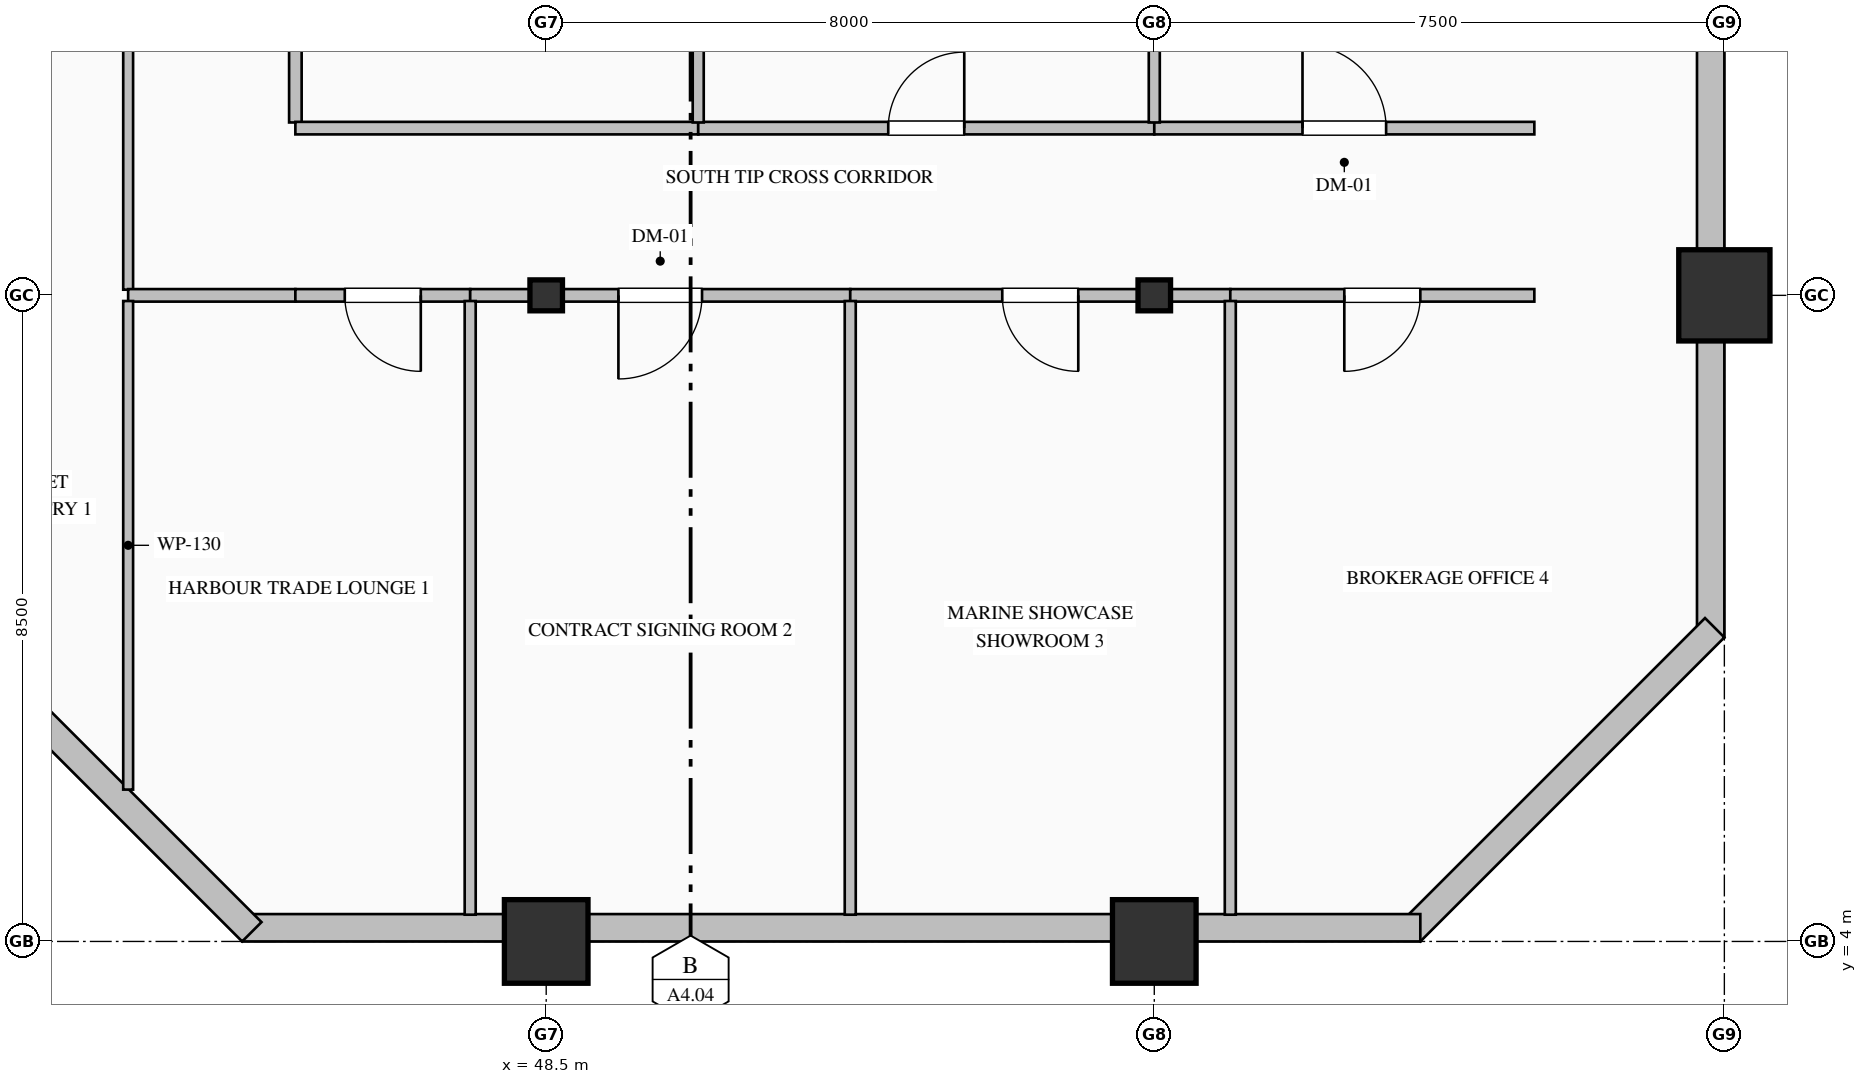
"""IFC4 building model, lengths in metres.
Left out: names, types, materials, properties, quantities, classifications, styles, units other than length and angle.
Written with IfcOpenShell. Run it as: python <this file> out.ifc"""

import sys

from ifc_helpers import new_model, si_unit, direction, frame, frame_2d, origin, origin_2d, place, context, subcontext, project, spatial, rectangle, hollow_rectangle, hollow_circle, i_section, extrude, element, fill, save


model = new_model("IFC4")
c1 = context("Model", 3, precision=1e-05, world=origin(), true_north=direction((0.0, 1.0)))
c2 = subcontext(c1, "Body", "Model", "MODEL_VIEW")
j1 = project(units=[si_unit("LENGTHUNIT", "METRE"), si_unit("PLANEANGLEUNIT", "RADIAN")], contexts=[c1])
p1 = place(None, origin())
s1 = spatial("IfcSite", under=j1, at=p1, CompositionType="ELEMENT")
p2 = place(p1, origin())
s2 = spatial("IfcBuilding", under=s1, at=p2, CompositionType="ELEMENT")
p3 = place(p2, frame((0.0, 0.0, 92.2)))
s3 = spatial("IfcBuildingStorey", under=s2, at=p3, CompositionType="ELEMENT", Elevation=92.2)
p4 = place(p3, frame((48.5, 4.0, 0.0), z_axis=(0.0, 0.0, 1.0), x_axis=(1.0, 0.0, 0.0)))
e1 = element("IfcColumn", 1, at=p4, inside=s3, PredefinedType="COLUMN", context=c2, shape_type="SweptSolid", body=[
    extrude(hollow_rectangle(XDim=1.1, YDim=1.1, WallThickness=0.04, at=origin_2d()), origin(), (0.0, 0.0, 1.0), 4.0),
])
p5 = place(p3, frame((48.5, 12.5, 0.0), z_axis=(0.0, 0.0, 1.0), x_axis=(1.0, 0.0, 0.0)))
e2 = element("IfcColumn", 2, at=p5, inside=s3, PredefinedType="COLUMN", context=c2, shape_type="SweptSolid", body=[
    extrude(i_section(OverallWidth=0.407, OverallDepth=0.428, WebThickness=0.02, FlangeThickness=0.035, FilletRadius=0.022, at=origin_2d()), origin(), (0.0, 0.0, 1.0), 4.0),
])
p6 = place(p3, frame((56.5, 4.0, 0.0), z_axis=(0.0, 0.0, 1.0), x_axis=(1.0, 0.0, 0.0)))
e3 = element("IfcColumn", 3, at=p6, inside=s3, PredefinedType="COLUMN", context=c2, shape_type="SweptSolid", body=[
    extrude(hollow_rectangle(XDim=1.1, YDim=1.1, WallThickness=0.04, at=origin_2d()), origin(), (0.0, 0.0, 1.0), 4.0),
])
p7 = place(p3, frame((56.5, 12.5, 0.0), z_axis=(0.0, 0.0, 1.0), x_axis=(1.0, 0.0, 0.0)))
e4 = element("IfcColumn", 4, at=p7, inside=s3, PredefinedType="COLUMN", context=c2, shape_type="SweptSolid", body=[
    extrude(i_section(OverallWidth=0.407, OverallDepth=0.428, WebThickness=0.02, FlangeThickness=0.035, FilletRadius=0.022, at=origin_2d()), origin(), (0.0, 0.0, 1.0), 4.0),
])
p8 = place(p3, frame((64.0, 12.5, 0.0), z_axis=(0.0, 0.0, 1.0), x_axis=(1.0, 0.0, 0.0)))
e5 = element("IfcColumn", 5, at=p8, inside=s3, PredefinedType="COLUMN", context=c2, shape_type="SweptSolid", body=[
    extrude(hollow_circle(Radius=0.6, WallThickness=0.04, at=origin_2d()), origin(), (0.0, 0.0, 1.0), 4.0),
])
p9 = place(p3, frame((63.82, 36.05, 0.0), z_axis=(0.0, 0.0, 1.0), x_axis=(0.0, -1.0, 0.0)))
e6 = element("IfcWall", 6, at=p9, inside=s3, PredefinedType="SOLIDWALL", context=c2, shape_type="SweptSolid", body=[
    extrude(rectangle(XDim=28.05, YDim=0.36, at=frame_2d((14.025, 0.0))), origin(), (0.0, 0.0, 1.0), 3.25),
])
p10 = place(p9, frame((2.55, 0.0, 0.85)))
e7 = element("IfcOpeningElement", 7, at=p10, cuts=e6, PredefinedType="OPENING", context=c2, shape_type="SweptSolid", body=[
    extrude(rectangle(XDim=2.1, YDim=2.05, at=frame_2d((1.05, 1.025))), frame((0.0, 0.19, 0.0), z_axis=(0.0, -1.0, 0.0), x_axis=(1.0, 0.0, 0.0)), (0.0, 0.0, 1.0), 0.38),
])
p11 = place(p9, frame((13.35, 0.0, 0.85)))
e8 = element("IfcOpeningElement", 8, at=p11, cuts=e6, PredefinedType="OPENING", context=c2, shape_type="SweptSolid", body=[
    extrude(rectangle(XDim=2.1, YDim=2.05, at=frame_2d((1.05, 1.025))), frame((0.0, 0.19, 0.0), z_axis=(0.0, -1.0, 0.0), x_axis=(1.0, 0.0, 0.0)), (0.0, 0.0, 1.0), 0.38),
])
p12 = place(p3, frame((63.873, 8.127, 0.0), z_axis=(0.0, 0.0, 1.0), x_axis=(-0.707106781187, -0.707106781187, 0.0)))
e9 = element("IfcWall", 9, at=p12, inside=s3, PredefinedType="SOLIDWALL", context=c2, shape_type="SweptSolid", body=[
    extrude(rectangle(XDim=5.657, YDim=0.36, at=frame_2d((2.828, 0.0))), origin(), (0.0, 0.0, 1.0), 3.75),
])
p13 = place(p3, frame((60.0, 4.18, 0.0), z_axis=(0.0, 0.0, 1.0), x_axis=(-1.0, 0.0, 0.0)))
e10 = element("IfcWall", 10, at=p13, inside=s3, PredefinedType="SOLIDWALL", context=c2, shape_type="SweptSolid", body=[
    extrude(rectangle(XDim=15.5, YDim=0.36, at=frame_2d((7.75, 0.0))), origin(), (0.0, 0.0, 1.0), 3.25),
])
p14 = place(p3, frame((44.627, 4.127, 0.0), z_axis=(0.0, 0.0, 1.0), x_axis=(-0.707106781187, 0.707106781187, 0.0)))
e11 = element("IfcWall", 11, at=p14, inside=s3, PredefinedType="SOLIDWALL", context=c2, shape_type="SweptSolid", body=[
    extrude(rectangle(XDim=5.657, YDim=0.36, at=frame_2d((2.828, 0.0))), origin(), (0.0, 0.0, 1.0), 3.75),
])
p15 = place(p3, frame((45.2, 24.226, 0.0), z_axis=(0.0, 0.0, 1.0), x_axis=(0.0, -1.0, 0.0)))
e12 = element("IfcWall", 12, at=p15, inside=s3, PredefinedType="PARTITIONING", context=c2, shape_type="SweptSolid", body=[
    extrude(rectangle(XDim=9.451, YDim=0.165, at=frame_2d((4.726, 0.0))), origin(), (0.0, 0.0, 1.0), 3.75),
])
p16 = place(p15, frame((4.226, 0.0, 0.0)))
e13 = element("IfcOpeningElement", 13, at=p16, cuts=e12, PredefinedType="OPENING", context=c2, shape_type="SweptSolid", body=[
    extrude(rectangle(XDim=1.0, YDim=2.15, at=frame_2d((0.5, 1.075))), frame((0.0, 0.093, 0.0), z_axis=(0.0, -1.0, 0.0), x_axis=(1.0, 0.0, 0.0)), (0.0, 0.0, 1.0), 0.185),
])
p17 = place(p3, frame((43.0, 12.574, 0.0), z_axis=(0.0, 0.0, 1.0), x_axis=(0.0, 1.0, 0.0)))
e14 = element("IfcWall", 14, at=p17, inside=s3, PredefinedType="PARTITIONING", context=c2, shape_type="SweptSolid", body=[
    extrude(rectangle(XDim=7.369, YDim=0.13, at=frame_2d((3.684, 0.0))), origin(), (0.0, 0.0, 1.0), 3.75),
])
p18 = place(p17, frame((3.184, 0.0, 0.0)))
e15 = element("IfcOpeningElement", 15, at=p18, cuts=e14, PredefinedType="OPENING", context=c2, shape_type="SweptSolid", body=[
    extrude(rectangle(XDim=1.0, YDim=2.15, at=frame_2d((0.5, 1.075))), frame((0.0, 0.075, 0.0), z_axis=(0.0, -1.0, 0.0), x_axis=(1.0, 0.0, 0.0)), (0.0, 0.0, 1.0), 0.15),
])
p19 = place(p3, frame((45.2, 12.5, 0.0), z_axis=(0.0, 0.0, 1.0), x_axis=(-1.0, 0.0, 0.0)))
e16 = element("IfcWall", 16, at=p19, inside=s3, PredefinedType="PARTITIONING", context=c2, shape_type="SweptSolid", body=[
    extrude(rectangle(XDim=2.2, YDim=0.165, at=frame_2d((1.1, 0.0))), origin(), (0.0, 0.0, 1.0), 3.042),
])
p20 = place(p3, frame((45.2, 14.7, 0.0), z_axis=(0.0, 0.0, 1.0), x_axis=(1.0, 0.0, 0.0)))
e17 = element("IfcWall", 17, at=p20, inside=s3, PredefinedType="PARTITIONING", context=c2, shape_type="SweptSolid", body=[
    extrude(rectangle(XDim=5.3, YDim=0.165, at=frame_2d((2.65, 0.0))), origin(), (0.0, 0.0, 1.0), 3.75),
])
p21 = place(p3, frame((50.5, 14.7, 0.0), z_axis=(0.0, 0.0, 1.0), x_axis=(1.0, 0.0, 0.0)))
e18 = element("IfcWall", 18, at=p21, inside=s3, PredefinedType="PARTITIONING", context=c2, shape_type="SweptSolid", body=[
    extrude(rectangle(XDim=6.0, YDim=0.165, at=frame_2d((3.0, 0.0))), origin(), (0.0, 0.0, 1.0), 3.75),
])
p22 = place(p21, frame((2.5, 0.0, 0.0)))
e19 = element("IfcOpeningElement", 19, at=p22, cuts=e18, PredefinedType="OPENING", context=c2, shape_type="SweptSolid", body=[
    extrude(rectangle(XDim=1.0, YDim=2.15, at=frame_2d((0.5, 1.075))), frame((0.0, 0.093, 0.0), z_axis=(0.0, -1.0, 0.0), x_axis=(1.0, 0.0, 0.0)), (0.0, 0.0, 1.0), 0.185),
])
p23 = place(p3, frame((56.5, 14.7, 0.0), z_axis=(0.0, 0.0, 1.0), x_axis=(1.0, 0.0, 0.0)))
e20 = element("IfcWall", 20, at=p23, inside=s3, PredefinedType="PARTITIONING", context=c2, shape_type="SweptSolid", body=[
    extrude(rectangle(XDim=5.0, YDim=0.165, at=frame_2d((2.5, 0.0))), origin(), (0.0, 0.0, 1.0), 3.75),
])
p24 = place(p23, frame((1.95, 0.0, 0.0)))
e21 = element("IfcOpeningElement", 21, at=p24, cuts=e20, PredefinedType="OPENING", context=c2, shape_type="SweptSolid", body=[
    extrude(rectangle(XDim=1.1, YDim=2.2, at=frame_2d((0.55, 1.1))), frame((0.0, 0.093, 0.0), z_axis=(0.0, -1.0, 0.0), x_axis=(1.0, 0.0, 0.0)), (0.0, 0.0, 1.0), 0.185),
])
p25 = place(p3, frame((47.5, 12.5, 0.0), z_axis=(0.0, 0.0, 1.0), x_axis=(-1.0, 0.0, 0.0)))
e22 = element("IfcWall", 22, at=p25, inside=s3, PredefinedType="PARTITIONING", context=c2, shape_type="SweptSolid", body=[
    extrude(rectangle(XDim=2.3, YDim=0.165, at=frame_2d((1.15, 0.0))), origin(), (0.0, 0.0, 1.0), 3.042),
])
p26 = place(p25, frame((0.65, 0.0, 0.0)))
e23 = element("IfcOpeningElement", 23, at=p26, cuts=e22, PredefinedType="OPENING", context=c2, shape_type="SweptSolid", body=[
    extrude(rectangle(XDim=1.0, YDim=2.15, at=frame_2d((0.5, 1.075))), frame((0.0, 0.093, 0.0), z_axis=(0.0, -1.0, 0.0), x_axis=(1.0, 0.0, 0.0)), (0.0, 0.0, 1.0), 0.185),
])
p27 = place(p3, frame((52.5, 12.5, 0.0), z_axis=(0.0, 0.0, 1.0), x_axis=(-1.0, 0.0, 0.0)))
e24 = element("IfcWall", 24, at=p27, inside=s3, PredefinedType="PARTITIONING", context=c2, shape_type="SweptSolid", body=[
    extrude(rectangle(XDim=5.0, YDim=0.165, at=frame_2d((2.5, 0.0))), origin(), (0.0, 0.0, 1.0), 3.042),
])
p28 = place(p27, frame((1.95, 0.0, 0.0)))
e25 = element("IfcOpeningElement", 25, at=p28, cuts=e24, PredefinedType="OPENING", context=c2, shape_type="SweptSolid", body=[
    extrude(rectangle(XDim=1.1, YDim=2.2, at=frame_2d((0.55, 1.1))), frame((0.0, 0.093, 0.0), z_axis=(0.0, -1.0, 0.0), x_axis=(1.0, 0.0, 0.0)), (0.0, 0.0, 1.0), 0.185),
])
p29 = place(p3, frame((57.5, 12.5, 0.0), z_axis=(0.0, 0.0, 1.0), x_axis=(-1.0, 0.0, 0.0)))
e26 = element("IfcWall", 26, at=p29, inside=s3, PredefinedType="PARTITIONING", context=c2, shape_type="SweptSolid", body=[
    extrude(rectangle(XDim=5.0, YDim=0.165, at=frame_2d((2.5, 0.0))), origin(), (0.0, 0.0, 1.0), 3.042),
])
p30 = place(p29, frame((2.0, 0.0, 0.0)))
e27 = element("IfcOpeningElement", 27, at=p30, cuts=e26, PredefinedType="OPENING", context=c2, shape_type="SweptSolid", body=[
    extrude(rectangle(XDim=1.0, YDim=2.15, at=frame_2d((0.5, 1.075))), frame((0.0, 0.093, 0.0), z_axis=(0.0, -1.0, 0.0), x_axis=(1.0, 0.0, 0.0)), (0.0, 0.0, 1.0), 0.185),
])
p31 = place(p3, frame((61.5, 12.5, 0.0), z_axis=(0.0, 0.0, 1.0), x_axis=(-1.0, 0.0, 0.0)))
e28 = element("IfcWall", 28, at=p31, inside=s3, PredefinedType="PARTITIONING", context=c2, shape_type="SweptSolid", body=[
    extrude(rectangle(XDim=4.0, YDim=0.165, at=frame_2d((2.0, 0.0))), origin(), (0.0, 0.0, 1.0), 3.042),
])
p32 = place(p31, frame((1.5, 0.0, 0.0)))
e29 = element("IfcOpeningElement", 29, at=p32, cuts=e28, PredefinedType="OPENING", context=c2, shape_type="SweptSolid", body=[
    extrude(rectangle(XDim=1.0, YDim=2.15, at=frame_2d((0.5, 1.075))), frame((0.0, 0.093, 0.0), z_axis=(0.0, -1.0, 0.0), x_axis=(1.0, 0.0, 0.0)), (0.0, 0.0, 1.0), 0.185),
])
p33 = place(p3, frame((50.5, 24.226, 0.0), z_axis=(0.0, 0.0, 1.0), x_axis=(0.0, -1.0, 0.0)))
e30 = element("IfcWall", 30, at=p33, inside=s3, PredefinedType="PARTITIONING", context=c2, shape_type="SweptSolid", body=[
    extrude(rectangle(XDim=9.451, YDim=0.145, at=frame_2d((4.726, 0.0))), origin(), (0.0, 0.0, 1.0), 3.75),
])
p34 = place(p3, frame((56.5, 24.226, 0.0), z_axis=(0.0, 0.0, 1.0), x_axis=(0.0, -1.0, 0.0)))
e31 = element("IfcWall", 31, at=p34, inside=s3, PredefinedType="PARTITIONING", context=c2, shape_type="SweptSolid", body=[
    extrude(rectangle(XDim=9.451, YDim=0.145, at=frame_2d((4.726, 0.0))), origin(), (0.0, 0.0, 1.0), 2.942),
])
p35 = place(p3, frame((43.0, 12.426, 0.0), z_axis=(0.0, 0.0, 1.0), x_axis=(0.0, -1.0, 0.0)))
e32 = element("IfcWall", 32, at=p35, inside=s3, PredefinedType="PARTITIONING", context=c2, shape_type="SweptSolid", body=[
    extrude(rectangle(XDim=6.428, YDim=0.13, at=frame_2d((3.214, 0.0))), origin(), (0.0, 0.0, 1.0), 3.75),
])
for number, where, z_axis, x_axis in (
    (33, (47.5, 12.426, 0.0), (0.0, 0.0, 1.0), (0.0, -1.0, 0.0)),
    (34, (52.5, 12.426, 0.0), (0.0, 0.0, 1.0), (0.0, -1.0, 0.0)),
    (35, (57.5, 12.426, 0.0), (0.0, 0.0, 1.0), (0.0, -1.0, 0.0)),
):
    element("IfcWall", number, at=place(p3, frame(where, z_axis=z_axis, x_axis=x_axis)), inside=s3, PredefinedType="PARTITIONING", context=c2, shape_type="SweptSolid", body=[
        extrude(rectangle(XDim=8.073, YDim=0.145, at=frame_2d((4.037, 0.0))), origin(), (0.0, 0.0, 1.0), 3.75),
    ])
p36 = place(p22, origin())
e36 = element("IfcDoor", 36, at=p36, inside=s3, OperationType="SINGLE_SWING_RIGHT", PredefinedType="DOOR", context=c2, shape_type="SweptSolid", body=[
    extrude(rectangle(XDim=1.0, YDim=2.15, at=frame_2d((0.5, 1.075))), frame((0.0, 0.025, 0.0), z_axis=(0.0, -1.0, 0.0), x_axis=(1.0, 0.0, 0.0)), (0.0, 0.0, 1.0), 0.05),
])
fill(e19, e36)
p37 = place(p24, origin())
e37 = element("IfcDoor", 37, at=p37, inside=s3, OperationType="SINGLE_SWING_LEFT", PredefinedType="DOOR", context=c2, shape_type="SweptSolid", body=[
    extrude(rectangle(XDim=1.1, YDim=2.2, at=frame_2d((0.55, 1.1))), frame((0.0, 0.025, 0.0), z_axis=(0.0, -1.0, 0.0), x_axis=(1.0, 0.0, 0.0)), (0.0, 0.0, 1.0), 0.05),
])
fill(e21, e37)
p38 = place(p26, origin())
e38 = element("IfcDoor", 38, at=p38, inside=s3, OperationType="SINGLE_SWING_LEFT", PredefinedType="DOOR", context=c2, shape_type="SweptSolid", body=[
    extrude(rectangle(XDim=1.0, YDim=2.15, at=frame_2d((0.5, 1.075))), frame((0.0, 0.025, 0.0), z_axis=(0.0, -1.0, 0.0), x_axis=(1.0, 0.0, 0.0)), (0.0, 0.0, 1.0), 0.05),
])
fill(e23, e38)
p39 = place(p28, origin())
e39 = element("IfcDoor", 39, at=p39, inside=s3, OperationType="SINGLE_SWING_RIGHT", PredefinedType="DOOR", context=c2, shape_type="SweptSolid", body=[
    extrude(rectangle(XDim=1.1, YDim=2.2, at=frame_2d((0.55, 1.1))), frame((0.0, 0.025, 0.0), z_axis=(0.0, -1.0, 0.0), x_axis=(1.0, 0.0, 0.0)), (0.0, 0.0, 1.0), 0.05),
])
fill(e25, e39)
p40 = place(p30, origin())
e40 = element("IfcDoor", 40, at=p40, inside=s3, OperationType="SINGLE_SWING_LEFT", PredefinedType="DOOR", context=c2, shape_type="SweptSolid", body=[
    extrude(rectangle(XDim=1.0, YDim=2.15, at=frame_2d((0.5, 1.075))), frame((0.0, 0.025, 0.0), z_axis=(0.0, -1.0, 0.0), x_axis=(1.0, 0.0, 0.0)), (0.0, 0.0, 1.0), 0.05),
])
fill(e27, e40)
p41 = place(p32, origin())
e41 = element("IfcDoor", 41, at=p41, inside=s3, OperationType="SINGLE_SWING_RIGHT", PredefinedType="DOOR", context=c2, shape_type="SweptSolid", body=[
    extrude(rectangle(XDim=1.0, YDim=2.15, at=frame_2d((0.5, 1.075))), frame((0.0, 0.025, 0.0), z_axis=(0.0, -1.0, 0.0), x_axis=(1.0, 0.0, 0.0)), (0.0, 0.0, 1.0), 0.05),
])
fill(e29, e41)
save(model, sys.argv[1])
